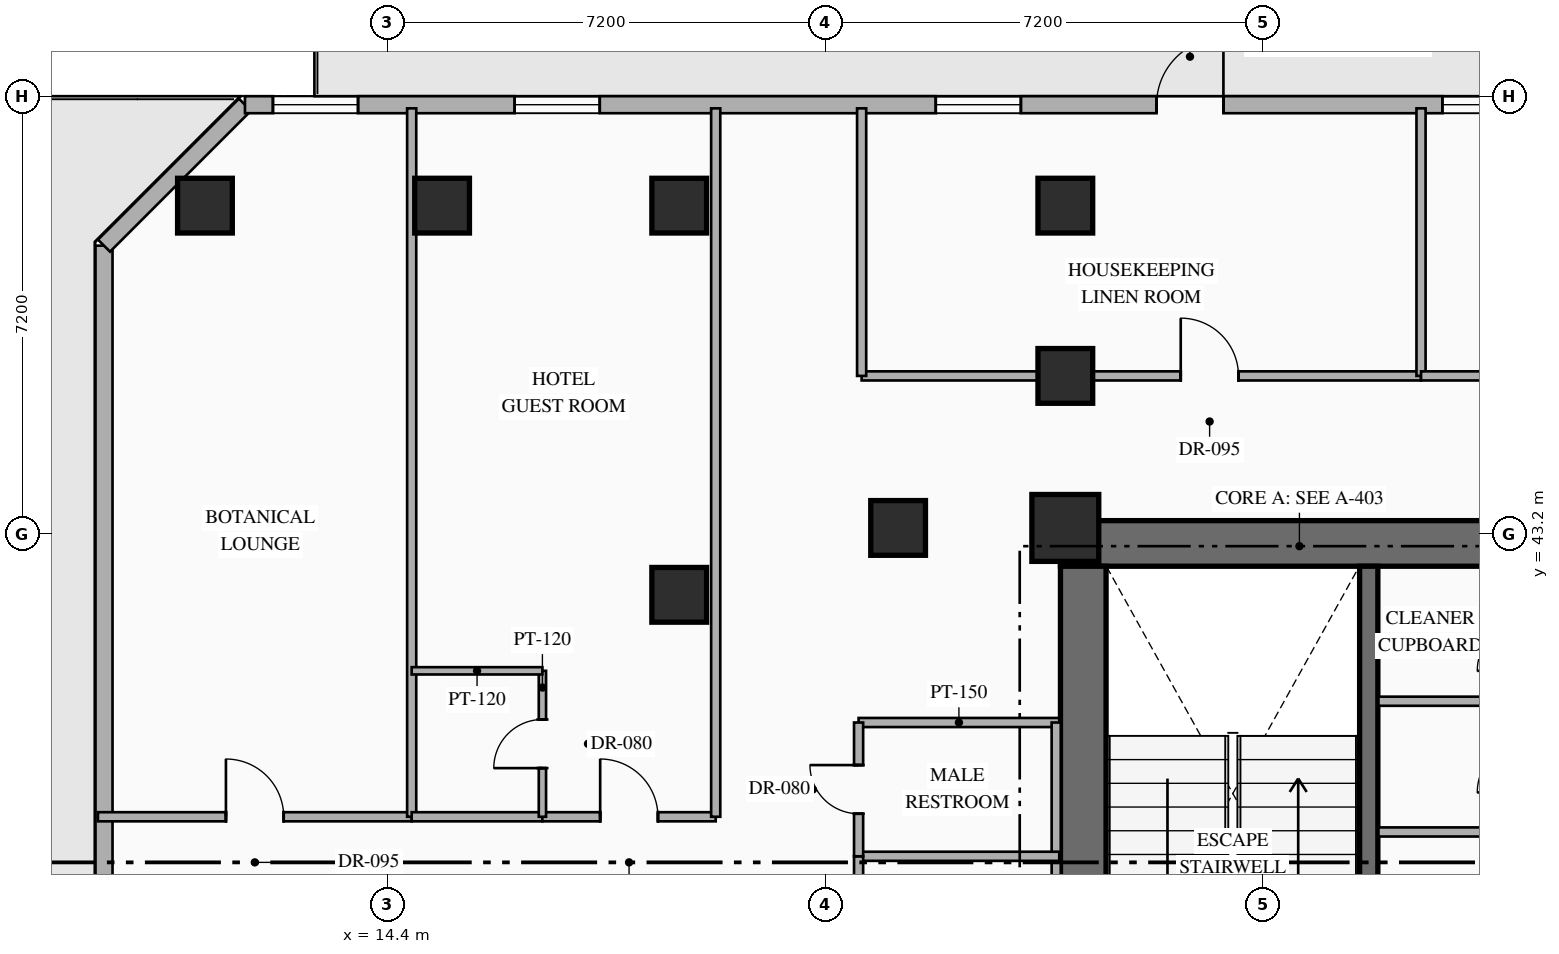
"""IFC4 building model, lengths in metres.
Left out: names, types, materials, properties, quantities, classifications, styles, units other than length and angle.
Written with IfcOpenShell. Run it as: python <this file> out.ifc"""

import sys

from ifc_helpers import new_model, si_unit, direction, frame, frame_2d, origin, origin_2d, place, context, subcontext, project, spatial, rectangle, hollow_rectangle, extrude, element, fill, save


model = new_model("IFC4")
c1 = context("Model", 3, precision=1e-05, world=origin(), true_north=direction((0.0, 1.0)))
c2 = subcontext(c1, "Body", "Model", "MODEL_VIEW")
j1 = project(units=[si_unit("LENGTHUNIT", "METRE"), si_unit("PLANEANGLEUNIT", "RADIAN")], contexts=[c1])
p1 = place(None, origin())
s1 = spatial("IfcSite", under=j1, at=p1, CompositionType="ELEMENT")
p2 = place(p1, origin())
s2 = spatial("IfcBuilding", under=s1, at=p2, CompositionType="ELEMENT")
p3 = place(p2, frame((0.0, 0.0, 70.1)))
s3 = spatial("IfcBuildingStorey", under=s2, at=p3, CompositionType="ELEMENT", Elevation=70.1)
p4 = place(p3, frame((25.47, 43.045, 0.0), z_axis=(0.0, 0.0, 1.0), x_axis=(1.0, 0.0, 0.0)))
e1 = element("IfcWall", 1, at=p4, inside=s3, PredefinedType="SHEAR", context=c2, shape_type="SweptSolid", body=[
    extrude(rectangle(XDim=8.08, YDim=0.75, at=frame_2d((4.04, 0.0))), origin(), (0.0, 0.0, 1.0), 4.5),
])
p5 = place(p3, frame((25.845, 33.19, 0.0), z_axis=(0.0, 0.0, 1.0), x_axis=(0.0, 1.0, 0.0)))
e2 = element("IfcWall", 2, at=p5, inside=s3, PredefinedType="SHEAR", context=c2, shape_type="SweptSolid", body=[
    extrude(rectangle(XDim=9.48, YDim=0.75, at=frame_2d((4.74, 0.0))), origin(), (0.0, 0.0, 1.0), 4.5),
])
p6 = place(p3, frame((30.54, 33.19, 0.0), z_axis=(0.0, 0.0, 1.0), x_axis=(0.0, 1.0, 0.0)))
e3 = element("IfcWall", 3, at=p6, inside=s3, PredefinedType="SHEAR", context=c2, shape_type="SweptSolid", body=[
    extrude(rectangle(XDim=9.48, YDim=0.3, at=frame_2d((4.74, 0.0))), origin(), (0.0, 0.0, 1.0), 4.5),
])
p7 = place(p3, frame((25.55, 43.3, 0.0), z_axis=(0.0, 0.0, 1.0), x_axis=(1.0, 0.0, 0.0)))
e4 = element("IfcColumn", 4, at=p7, inside=s3, PredefinedType="COLUMN", context=c2, shape_type="SweptSolid", body=[
    extrude(rectangle(XDim=1.1, YDim=1.1, at=origin_2d()), origin(), (0.0, 0.0, 1.0), 4.5),
])
for number, where, z_axis, x_axis in (
    (5, (25.55, 45.8, 0.0), (0.0, 0.0, 1.0), (1.0, 0.0, 0.0)),
    (6, (11.4, 48.6, 0.0), (0.0, 0.0, 1.0), (1.0, 0.0, 0.0)),
    (7, (19.2, 48.6, 0.0), (0.0, 0.0, 1.0), (1.0, 0.0, 0.0)),
    (8, (25.55, 48.6, 0.0), (0.0, 0.0, 1.0), (1.0, 0.0, 0.0)),
    (9, (19.2, 42.2, 0.0), (0.0, 0.0, 1.0), (1.0, 0.0, 0.0)),
    (10, (22.8, 43.3, 0.0), (0.0, 0.0, 1.0), (1.0, 0.0, 0.0)),
    (11, (15.3, 48.6, 0.0), (0.0, 0.0, 1.0), (1.0, 0.0, 0.0)),
):
    element("IfcColumn", number, at=place(p3, frame(where, z_axis=z_axis, x_axis=x_axis)), inside=s3, PredefinedType="COLUMN", context=c2, shape_type="SweptSolid", body=[
        extrude(hollow_rectangle(XDim=0.9, YDim=0.9, WallThickness=0.036, at=origin_2d()), origin(), (0.0, 0.0, 1.0), 4.5),
    ])
p8 = place(p3, frame((9.74, 25.858, 0.0), z_axis=(0.0, 0.0, 1.0), x_axis=(0.0, 1.0, 0.0)))
e12 = element("IfcWall", 12, at=p8, inside=s3, PredefinedType="STANDARD", context=c2, shape_type="SweptSolid", body=[
    extrude(rectangle(XDim=22.084, YDim=0.28, at=frame_2d((11.042, 0.0))), origin(), (0.0, 0.0, 1.0), 4.28),
])
p9 = place(p8, frame((4.407, 0.0, 0.0)))
e13 = element("IfcOpeningElement", 13, at=p9, cuts=e12, PredefinedType="OPENING", context=c2, shape_type="SweptSolid", body=[
    extrude(rectangle(XDim=1.1, YDim=2.2, at=frame_2d((0.55, 1.1))), frame((0.0, 0.15, 0.0), z_axis=(0.0, -1.0, 0.0), x_axis=(1.0, 0.0, 0.0)), (0.0, 0.0, 1.0), 0.3),
])
p10 = place(p8, frame((1.6, 0.0, 0.75)))
e14 = element("IfcOpeningElement", 14, at=p10, cuts=e12, PredefinedType="OPENING", context=c2, shape_type="SweptSolid", body=[
    extrude(rectangle(XDim=2.1, YDim=2.2, at=frame_2d((1.05, 1.1))), frame((0.0, 0.15, 0.0), z_axis=(0.0, -1.0, 0.0), x_axis=(1.0, 0.0, 0.0)), (0.0, 0.0, 1.0), 0.3),
])
p11 = place(p3, frame((9.74, 47.942, 0.0), z_axis=(0.0, 0.0, 1.0), x_axis=(0.707106781187, 0.707106781187, 0.0)))
e15 = element("IfcWall", 15, at=p11, inside=s3, PredefinedType="STANDARD", context=c2, shape_type="SweptSolid", body=[
    extrude(rectangle(XDim=3.278, YDim=0.28, at=frame_2d((1.639, 0.0))), origin(), (0.0, 0.0, 1.0), 4.28),
])
p12 = place(p3, frame((12.058, 50.26, 0.0), z_axis=(0.0, 0.0, 1.0), x_axis=(1.0, 0.0, 0.0)))
e16 = element("IfcWall", 16, at=p12, inside=s3, PredefinedType="STANDARD", context=c2, shape_type="SweptSolid", body=[
    extrude(rectangle(XDim=30.484, YDim=0.28, at=frame_2d((15.242, 0.0))), origin(), (0.0, 0.0, 1.0), 4.28),
])
p13 = place(p12, frame((14.992, 0.0, 0.0)))
e17 = element("IfcOpeningElement", 17, at=p13, cuts=e16, PredefinedType="OPENING", context=c2, shape_type="SweptSolid", body=[
    extrude(rectangle(XDim=1.1, YDim=2.2, at=frame_2d((0.55, 1.1))), frame((0.0, 0.15, 0.0), z_axis=(0.0, -1.0, 0.0), x_axis=(1.0, 0.0, 0.0)), (0.0, 0.0, 1.0), 0.3),
])
p14 = place(p12, frame((0.46, 0.0, 0.85)))
e18 = element("IfcOpeningElement", 18, at=p14, cuts=e16, PredefinedType="OPENING", context=c2, shape_type="SweptSolid", body=[
    extrude(rectangle(XDim=1.4, YDim=1.8, at=frame_2d((0.7, 0.9))), frame((0.0, 0.15, 0.0), z_axis=(0.0, -1.0, 0.0), x_axis=(1.0, 0.0, 0.0)), (0.0, 0.0, 1.0), 0.3),
])
p15 = place(p12, frame((4.435, 0.0, 0.85)))
e19 = element("IfcOpeningElement", 19, at=p15, cuts=e16, PredefinedType="OPENING", context=c2, shape_type="SweptSolid", body=[
    extrude(rectangle(XDim=1.4, YDim=1.8, at=frame_2d((0.7, 0.9))), frame((0.0, 0.15, 0.0), z_axis=(0.0, -1.0, 0.0), x_axis=(1.0, 0.0, 0.0)), (0.0, 0.0, 1.0), 0.3),
])
p16 = place(p12, frame((11.361, 0.0, 0.85)))
e20 = element("IfcOpeningElement", 20, at=p16, cuts=e16, PredefinedType="OPENING", context=c2, shape_type="SweptSolid", body=[
    extrude(rectangle(XDim=1.4, YDim=1.8, at=frame_2d((0.7, 0.9))), frame((0.0, 0.15, 0.0), z_axis=(0.0, -1.0, 0.0), x_axis=(1.0, 0.0, 0.0)), (0.0, 0.0, 1.0), 0.3),
])
p17 = place(p12, frame((19.693, 0.0, 0.85)))
e21 = element("IfcOpeningElement", 21, at=p17, cuts=e16, PredefinedType="OPENING", context=c2, shape_type="SweptSolid", body=[
    extrude(rectangle(XDim=1.4, YDim=1.8, at=frame_2d((0.7, 0.9))), frame((0.0, 0.15, 0.0), z_axis=(0.0, -1.0, 0.0), x_axis=(1.0, 0.0, 0.0)), (0.0, 0.0, 1.0), 0.3),
])
p18 = place(p12, frame((23.252, 0.0, 0.85)))
e22 = element("IfcOpeningElement", 22, at=p18, cuts=e16, PredefinedType="OPENING", context=c2, shape_type="SweptSolid", body=[
    extrude(rectangle(XDim=1.4, YDim=1.8, at=frame_2d((0.7, 0.9))), frame((0.0, 0.15, 0.0), z_axis=(0.0, -1.0, 0.0), x_axis=(1.0, 0.0, 0.0)), (0.0, 0.0, 1.0), 0.3),
])
p19 = place(p12, frame((27.417, 0.0, 0.85)))
e23 = element("IfcOpeningElement", 23, at=p19, cuts=e16, PredefinedType="OPENING", context=c2, shape_type="SweptSolid", body=[
    extrude(rectangle(XDim=1.4, YDim=1.8, at=frame_2d((0.7, 0.9))), frame((0.0, 0.15, 0.0), z_axis=(0.0, -1.0, 0.0), x_axis=(1.0, 0.0, 0.0)), (0.0, 0.0, 1.0), 0.3),
])
for number, where, z_axis, x_axis in (
    (24, (30.7, 38.3, 0.0), (0.0, 0.0, 1.0), (1.0, 0.0, 0.0)),
    (25, (30.7, 40.45, 0.0), (0.0, 0.0, 1.0), (1.0, 0.0, 0.0)),
):
    element("IfcWall", number, at=place(p3, frame(where, z_axis=z_axis, x_axis=x_axis)), inside=s3, PredefinedType="PARTITIONING", context=c2, shape_type="SweptSolid", body=[
        extrude(rectangle(XDim=2.1, YDim=0.15, at=frame_2d((1.05, 0.0))), origin(), (0.0, 0.0, 1.0), 4.28),
    ])
p20 = place(p3, frame((22.15, 40.1, 0.0), z_axis=(0.0, 0.0, 1.0), x_axis=(1.0, 0.0, 0.0)))
e26 = element("IfcWall", 26, at=p20, inside=s3, PredefinedType="PARTITIONING", context=c2, shape_type="SweptSolid", body=[
    extrude(rectangle(XDim=3.3, YDim=0.15, at=frame_2d((1.65, 0.0))), origin(), (0.0, 0.0, 1.0), 4.28),
])
p21 = place(p3, frame((25.4, 33.5, 0.0), z_axis=(0.0, 0.0, 1.0), x_axis=(0.0, 1.0, 0.0)))
e27 = element("IfcWall", 27, at=p21, inside=s3, PredefinedType="PARTITIONING", context=c2, shape_type="SweptSolid", body=[
    extrude(rectangle(XDim=6.6, YDim=0.15, at=frame_2d((3.3, 0.0))), origin(), (0.0, 0.0, 1.0), 4.28),
])
p22 = place(p3, frame((22.15, 37.9, 0.0), z_axis=(0.0, 0.0, 1.0), x_axis=(1.0, 0.0, 0.0)))
e28 = element("IfcWall", 28, at=p22, inside=s3, PredefinedType="PARTITIONING", context=c2, shape_type="SweptSolid", body=[
    extrude(rectangle(XDim=3.3, YDim=0.15, at=frame_2d((1.65, 0.0))), origin(), (0.0, 0.0, 1.0), 4.28),
])
p23 = place(p3, frame((22.15, 35.7, 0.0), z_axis=(0.0, 0.0, 1.0), x_axis=(0.0, 1.0, 0.0)))
e29 = element("IfcWall", 29, at=p23, inside=s3, PredefinedType="PARTITIONING", context=c2, shape_type="SweptSolid", body=[
    extrude(rectangle(XDim=2.2, YDim=0.15, at=frame_2d((1.1, 0.0))), origin(), (0.0, 0.0, 1.0), 4.28),
])
p24 = place(p23, frame((0.7, 0.0, 0.0)))
e30 = element("IfcOpeningElement", 30, at=p24, cuts=e29, PredefinedType="OPENING", context=c2, shape_type="SweptSolid", body=[
    extrude(rectangle(XDim=0.8, YDim=2.06, at=frame_2d((0.4, 1.03))), frame((0.0, 0.085, 0.0), z_axis=(0.0, -1.0, 0.0), x_axis=(1.0, 0.0, 0.0)), (0.0, 0.0, 1.0), 0.17),
])
p25 = place(p3, frame((22.15, 37.9, 0.0), z_axis=(0.0, 0.0, 1.0), x_axis=(0.0, 1.0, 0.0)))
e31 = element("IfcWall", 31, at=p25, inside=s3, PredefinedType="PARTITIONING", context=c2, shape_type="SweptSolid", body=[
    extrude(rectangle(XDim=2.2, YDim=0.15, at=frame_2d((1.1, 0.0))), origin(), (0.0, 0.0, 1.0), 4.28),
])
p26 = place(p25, frame((0.7, 0.0, 0.0)))
e32 = element("IfcOpeningElement", 32, at=p26, cuts=e31, PredefinedType="OPENING", context=c2, shape_type="SweptSolid", body=[
    extrude(rectangle(XDim=0.8, YDim=2.06, at=frame_2d((0.4, 1.03))), frame((0.0, 0.085, 0.0), z_axis=(0.0, -1.0, 0.0), x_axis=(1.0, 0.0, 0.0)), (0.0, 0.0, 1.0), 0.17),
])
p27 = place(p3, frame((22.2, 45.8, 0.0), z_axis=(0.0, 0.0, 1.0), x_axis=(1.0, 0.0, 0.0)))
e33 = element("IfcWall", 33, at=p27, inside=s3, PredefinedType="PARTITIONING", context=c2, shape_type="SweptSolid", body=[
    extrude(rectangle(XDim=9.2, YDim=0.15, at=frame_2d((4.6, 0.0))), origin(), (0.0, 0.0, 1.0), 3.475),
])
p28 = place(p27, frame((5.248, 0.0, 0.0)))
e34 = element("IfcOpeningElement", 34, at=p28, cuts=e33, PredefinedType="OPENING", context=c2, shape_type="SweptSolid", body=[
    extrude(rectangle(XDim=0.95, YDim=2.15, at=frame_2d((0.475, 1.075))), frame((0.0, 0.085, 0.0), z_axis=(0.0, -1.0, 0.0), x_axis=(1.0, 0.0, 0.0)), (0.0, 0.0, 1.0), 0.17),
])
for number, where, z_axis, x_axis in (
    (35, (22.2, 45.8, 0.0), (0.0, 0.0, 1.0), (0.0, 1.0, 0.0)),
    (36, (31.4, 45.8, 0.0), (0.0, 0.0, 1.0), (0.0, 1.0, 0.0)),
):
    element("IfcWall", number, at=place(p3, frame(where, z_axis=z_axis, x_axis=x_axis)), inside=s3, PredefinedType="PARTITIONING", context=c2, shape_type="SweptSolid", body=[
        extrude(rectangle(XDim=4.4, YDim=0.15, at=frame_2d((2.2, 0.0))), origin(), (0.0, 0.0, 1.0), 4.28),
    ])
p29 = place(p3, frame((31.4, 45.8, 0.0), z_axis=(0.0, 0.0, 1.0), x_axis=(1.0, 0.0, 0.0)))
e37 = element("IfcWall", 37, at=p29, inside=s3, PredefinedType="PARTITIONING", context=c2, shape_type="SweptSolid", body=[
    extrude(rectangle(XDim=13.0, YDim=0.15, at=frame_2d((6.5, 0.0))), origin(), (0.0, 0.0, 1.0), 3.475),
])
p30 = place(p29, frame((6.025, 0.0, 0.0)))
e38 = element("IfcOpeningElement", 38, at=p30, cuts=e37, PredefinedType="OPENING", context=c2, shape_type="SweptSolid", body=[
    extrude(rectangle(XDim=0.95, YDim=2.15, at=frame_2d((0.475, 1.075))), frame((0.0, 0.085, 0.0), z_axis=(0.0, -1.0, 0.0), x_axis=(1.0, 0.0, 0.0)), (0.0, 0.0, 1.0), 0.17),
])
p31 = place(p3, frame((9.64, 38.55, 0.0), z_axis=(0.0, 0.0, 1.0), x_axis=(1.0, 0.0, 0.0)))
e39 = element("IfcWall", 39, at=p31, inside=s3, PredefinedType="PARTITIONING", context=c2, shape_type="SweptSolid", body=[
    extrude(rectangle(XDim=5.16, YDim=0.15, at=frame_2d((2.58, 0.0))), origin(), (0.0, 0.0, 1.0), 3.925),
])
p32 = place(p31, frame((2.105, 0.0, 0.0)))
e40 = element("IfcOpeningElement", 40, at=p32, cuts=e39, PredefinedType="OPENING", context=c2, shape_type="SweptSolid", body=[
    extrude(rectangle(XDim=0.95, YDim=2.15, at=frame_2d((0.475, 1.075))), frame((0.0, 0.085, 0.0), z_axis=(0.0, -1.0, 0.0), x_axis=(1.0, 0.0, 0.0)), (0.0, 0.0, 1.0), 0.17),
])
p33 = place(p3, frame((14.8, 38.55, 0.0), z_axis=(0.0, 0.0, 1.0), x_axis=(0.0, 1.0, 0.0)))
e41 = element("IfcWall", 41, at=p33, inside=s3, PredefinedType="PARTITIONING", context=c2, shape_type="SweptSolid", body=[
    extrude(rectangle(XDim=11.65, YDim=0.15, at=frame_2d((5.825, 0.0))), origin(), (0.0, 0.0, 1.0), 4.28),
])
p34 = place(p3, frame((14.8, 38.55, 0.0), z_axis=(0.0, 0.0, 1.0), x_axis=(1.0, 0.0, 0.0)))
e42 = element("IfcWall", 42, at=p34, inside=s3, PredefinedType="PARTITIONING", context=c2, shape_type="SweptSolid", body=[
    extrude(rectangle(XDim=2.15, YDim=0.15, at=frame_2d((1.075, 0.0))), origin(), (0.0, 0.0, 1.0), 3.925),
])
p35 = place(p3, frame((16.95, 38.55, 0.0), z_axis=(0.0, 0.0, 1.0), x_axis=(1.0, 0.0, 0.0)))
e43 = element("IfcWall", 43, at=p35, inside=s3, PredefinedType="PARTITIONING", context=c2, shape_type="SweptSolid", body=[
    extrude(rectangle(XDim=2.85, YDim=0.15, at=frame_2d((1.425, 0.0))), origin(), (0.0, 0.0, 1.0), 3.925),
])
p36 = place(p35, frame((0.95, 0.0, 0.0)))
e44 = element("IfcOpeningElement", 44, at=p36, cuts=e43, PredefinedType="OPENING", context=c2, shape_type="SweptSolid", body=[
    extrude(rectangle(XDim=0.95, YDim=2.15, at=frame_2d((0.475, 1.075))), frame((0.0, 0.085, 0.0), z_axis=(0.0, -1.0, 0.0), x_axis=(1.0, 0.0, 0.0)), (0.0, 0.0, 1.0), 0.17),
])
p37 = place(p3, frame((16.95, 38.55, 0.0), z_axis=(0.0, 0.0, 1.0), x_axis=(0.0, 1.0, 0.0)))
e45 = element("IfcWall", 45, at=p37, inside=s3, PredefinedType="PARTITIONING", context=c2, shape_type="SweptSolid", body=[
    extrude(rectangle(XDim=2.4, YDim=0.12, at=frame_2d((1.2, 0.0))), origin(), (0.0, 0.0, 1.0), 4.28),
])
p38 = place(p37, frame((0.8, 0.0, 0.0)))
e46 = element("IfcOpeningElement", 46, at=p38, cuts=e45, PredefinedType="OPENING", context=c2, shape_type="SweptSolid", body=[
    extrude(rectangle(XDim=0.8, YDim=2.06, at=frame_2d((0.4, 1.03))), frame((0.0, 0.07, 0.0), z_axis=(0.0, -1.0, 0.0), x_axis=(1.0, 0.0, 0.0)), (0.0, 0.0, 1.0), 0.14),
])
p39 = place(p3, frame((14.8, 40.95, 0.0), z_axis=(0.0, 0.0, 1.0), x_axis=(1.0, 0.0, 0.0)))
e47 = element("IfcWall", 47, at=p39, inside=s3, PredefinedType="PARTITIONING", context=c2, shape_type="SweptSolid", body=[
    extrude(rectangle(XDim=2.15, YDim=0.12, at=frame_2d((1.075, 0.0))), origin(), (0.0, 0.0, 1.0), 3.925),
])
p40 = place(p3, frame((19.8, 38.55, 0.0), z_axis=(0.0, 0.0, 1.0), x_axis=(0.0, 1.0, 0.0)))
e48 = element("IfcWall", 48, at=p40, inside=s3, PredefinedType="PARTITIONING", context=c2, shape_type="SweptSolid", body=[
    extrude(rectangle(XDim=11.65, YDim=0.15, at=frame_2d((5.825, 0.0))), origin(), (0.0, 0.0, 1.0), 4.28),
])
p41 = place(p13, origin())
e49 = element("IfcDoor", 49, at=p41, inside=s3, OperationType="SINGLE_SWING_RIGHT", PredefinedType="DOOR", context=c2, shape_type="SweptSolid", body=[
    extrude(rectangle(XDim=1.1, YDim=2.2, at=frame_2d((0.55, 1.1))), frame((0.0, 0.025, 0.0), z_axis=(0.0, -1.0, 0.0), x_axis=(1.0, 0.0, 0.0)), (0.0, 0.0, 1.0), 0.05),
])
fill(e17, e49)
p42 = place(p14, origin())
e50 = element("IfcWindow", 50, at=p42, inside=s3, PartitioningType="SINGLE_PANEL", PredefinedType="WINDOW", context=c2, shape_type="SweptSolid", body=[
    extrude(rectangle(XDim=1.4, YDim=1.8, at=frame_2d((0.7, 0.9))), frame((0.0, 0.03, 0.0), z_axis=(0.0, -1.0, 0.0), x_axis=(1.0, 0.0, 0.0)), (0.0, 0.0, 1.0), 0.06),
])
fill(e18, e50)
p43 = place(p15, origin())
e51 = element("IfcWindow", 51, at=p43, inside=s3, PartitioningType="SINGLE_PANEL", PredefinedType="WINDOW", context=c2, shape_type="SweptSolid", body=[
    extrude(rectangle(XDim=1.4, YDim=1.8, at=frame_2d((0.7, 0.9))), frame((0.0, 0.03, 0.0), z_axis=(0.0, -1.0, 0.0), x_axis=(1.0, 0.0, 0.0)), (0.0, 0.0, 1.0), 0.06),
])
fill(e19, e51)
p44 = place(p16, origin())
e52 = element("IfcWindow", 52, at=p44, inside=s3, PartitioningType="SINGLE_PANEL", PredefinedType="WINDOW", context=c2, shape_type="SweptSolid", body=[
    extrude(rectangle(XDim=1.4, YDim=1.8, at=frame_2d((0.7, 0.9))), frame((0.0, 0.03, 0.0), z_axis=(0.0, -1.0, 0.0), x_axis=(1.0, 0.0, 0.0)), (0.0, 0.0, 1.0), 0.06),
])
fill(e20, e52)
p45 = place(p17, origin())
e53 = element("IfcWindow", 53, at=p45, inside=s3, PartitioningType="SINGLE_PANEL", PredefinedType="WINDOW", context=c2, shape_type="SweptSolid", body=[
    extrude(rectangle(XDim=1.4, YDim=1.8, at=frame_2d((0.7, 0.9))), frame((0.0, 0.03, 0.0), z_axis=(0.0, -1.0, 0.0), x_axis=(1.0, 0.0, 0.0)), (0.0, 0.0, 1.0), 0.06),
])
fill(e21, e53)
p46 = place(p26, origin())
e54 = element("IfcDoor", 54, at=p46, inside=s3, OperationType="SINGLE_SWING_RIGHT", PredefinedType="DOOR", context=c2, shape_type="SweptSolid", body=[
    extrude(rectangle(XDim=0.8, YDim=2.06, at=frame_2d((0.4, 1.03))), frame((0.0, 0.025, 0.0), z_axis=(0.0, -1.0, 0.0), x_axis=(1.0, 0.0, 0.0)), (0.0, 0.0, 1.0), 0.05),
])
fill(e32, e54)
p47 = place(p28, origin())
e55 = element("IfcDoor", 55, at=p47, inside=s3, OperationType="SINGLE_SWING_LEFT", PredefinedType="DOOR", context=c2, shape_type="SweptSolid", body=[
    extrude(rectangle(XDim=0.95, YDim=2.15, at=frame_2d((0.475, 1.075))), frame((0.0, 0.025, 0.0), z_axis=(0.0, -1.0, 0.0), x_axis=(1.0, 0.0, 0.0)), (0.0, 0.0, 1.0), 0.05),
])
fill(e34, e55)
p48 = place(p32, origin())
e56 = element("IfcDoor", 56, at=p48, inside=s3, OperationType="SINGLE_SWING_LEFT", PredefinedType="DOOR", context=c2, shape_type="SweptSolid", body=[
    extrude(rectangle(XDim=0.95, YDim=2.15, at=frame_2d((0.475, 1.075))), frame((0.0, 0.025, 0.0), z_axis=(0.0, -1.0, 0.0), x_axis=(1.0, 0.0, 0.0)), (0.0, 0.0, 1.0), 0.05),
])
fill(e40, e56)
p49 = place(p36, origin())
e57 = element("IfcDoor", 57, at=p49, inside=s3, OperationType="SINGLE_SWING_LEFT", PredefinedType="DOOR", context=c2, shape_type="SweptSolid", body=[
    extrude(rectangle(XDim=0.95, YDim=2.15, at=frame_2d((0.475, 1.075))), frame((0.0, 0.025, 0.0), z_axis=(0.0, -1.0, 0.0), x_axis=(1.0, 0.0, 0.0)), (0.0, 0.0, 1.0), 0.05),
])
fill(e44, e57)
p50 = place(p38, origin())
e58 = element("IfcDoor", 58, at=p50, inside=s3, OperationType="SINGLE_SWING_LEFT", PredefinedType="DOOR", context=c2, shape_type="SweptSolid", body=[
    extrude(rectangle(XDim=0.8, YDim=2.06, at=frame_2d((0.4, 1.03))), frame((0.0, 0.025, 0.0), z_axis=(0.0, -1.0, 0.0), x_axis=(1.0, 0.0, 0.0)), (0.0, 0.0, 1.0), 0.05),
])
fill(e46, e58)
save(model, sys.argv[1])
